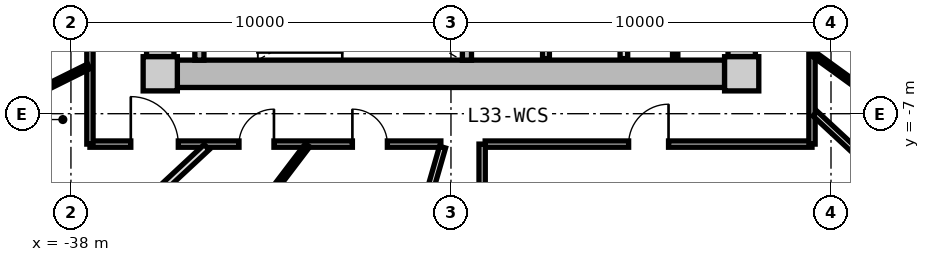
"""IFC4 building model, lengths in metres.
Left out: names, types, materials, properties, quantities, classifications, styles, units other than length and angle.
Written with IfcOpenShell. Run it as: python <this file> out.ifc"""

import sys

from ifc_helpers import new_model, si_unit, direction, frame, frame_2d, origin, origin_2d, place, context, subcontext, project, spatial, rectangle, extrude, source, transform, mapped, element, fill, save


model = new_model("IFC4")
c1 = context("Model", 3, precision=1e-05, world=origin(), true_north=direction((0.0, 1.0)))
c2 = subcontext(c1, "Body", "Model", "MODEL_VIEW")
j1 = project(units=[si_unit("LENGTHUNIT", "METRE"), si_unit("PLANEANGLEUNIT", "RADIAN")], contexts=[c1])
p1 = place(None, origin())
s1 = spatial("IfcSite", under=j1, at=p1, CompositionType="ELEMENT")
p2 = place(p1, origin())
s2 = spatial("IfcBuilding", under=s1, at=p2, CompositionType="ELEMENT")
p3 = place(p2, frame((0.0, 0.0, 108.45)))
s3 = spatial("IfcBuildingStorey", under=s2, at=p3, CompositionType="ELEMENT", Elevation=108.45)
m1 = source(origin(), c2, "Body", "SweptSolid", [
    extrude(rectangle(XDim=0.9, YDim=0.9, at=origin_2d()), origin(), (0.0, 0.0, 1.0), 3.05),
])
for number, where, z_axis, x_axis in (
    (1, (-35.65, -5.95, 0.0), (0.0, 0.0, 1.0), (1.0, 0.0, 0.0)),
    (2, (-20.35, -5.95, 0.0), (0.0, 0.0, 1.0), (1.0, 0.0, 0.0)),
):
    element("IfcColumn", number, at=place(p3, frame(where, z_axis=z_axis, x_axis=x_axis)), inside=s3, PredefinedType="COLUMN", context=c2, shape_type="MappedRepresentation", body=[
        mapped(m1, transform((0.0, 0.0, 0.0), x_axis=(1.0, 0.0, 0.0), y_axis=(0.0, 1.0, 0.0), z_axis=(0.0, 0.0, 1.0), scale=1.0)),
    ])
m2 = source(origin(), c2, "Body", "SweptSolid", [
    extrude(rectangle(XDim=14.4, YDim=0.72, at=frame_2d((7.2, 0.0))), origin(), (0.0, 0.0, 1.0), 2.79),
])
p4 = place(p3, frame((-20.8, -5.95, 0.0), z_axis=(0.0, 0.0, 1.0), x_axis=(-1.0, 0.0, 0.0)))
e3 = element("IfcWall", 3, at=p4, inside=s3, PredefinedType="SHEAR", context=c2, shape_type="MappedRepresentation", body=[
    mapped(m2, transform((0.0, 0.0, 0.0), x_axis=(1.0, 0.0, 0.0), y_axis=(0.0, 1.0, 0.0), z_axis=(0.0, 0.0, 1.0), scale=1.0)),
])
m3 = source(origin(), c2, "Body", "SweptSolid", [
    extrude(rectangle(XDim=11.0, YDim=0.72, at=frame_2d((5.5, 0.0))), origin(), (0.0, 0.0, 1.0), 2.79),
])
p5 = place(p3, frame((-35.65, -5.5, 0.0), z_axis=(0.0, 0.0, 1.0), x_axis=(0.0, 1.0, 0.0)))
e4 = element("IfcWall", 4, at=p5, inside=s3, PredefinedType="SHEAR", context=c2, shape_type="MappedRepresentation", body=[
    mapped(m3, transform((0.0, 0.0, 0.0), x_axis=(1.0, 0.0, 0.0), y_axis=(0.0, 1.0, 0.0), z_axis=(0.0, 0.0, 1.0), scale=1.0)),
])
p6 = place(p5, frame((3.8, 0.0, 0.0)))
e5 = element("IfcOpeningElement", 5, at=p6, cuts=e4, PredefinedType="OPENING", context=c2, shape_type="SweptSolid", body=[
    extrude(rectangle(XDim=1.2, YDim=2.15, at=frame_2d((0.6, 1.075))), frame((0.0, 0.37, 0.0), z_axis=(0.0, -1.0, 0.0), x_axis=(1.0, 0.0, 0.0)), (0.0, 0.0, 1.0), 0.74),
])
p7 = place(p3, frame((-20.35, 5.5, 0.0), z_axis=(0.0, 0.0, 1.0), x_axis=(0.0, -1.0, 0.0)))
e6 = element("IfcWall", 6, at=p7, inside=s3, PredefinedType="SHEAR", context=c2, shape_type="MappedRepresentation", body=[
    mapped(m3, transform((0.0, 0.0, 0.0), x_axis=(1.0, 0.0, 0.0), y_axis=(0.0, 1.0, 0.0), z_axis=(0.0, 0.0, 1.0), scale=1.0)),
])
p8 = place(p7, frame((5.65, 0.0, 0.0)))
e7 = element("IfcOpeningElement", 7, at=p8, cuts=e6, PredefinedType="OPENING", context=c2, shape_type="SweptSolid", body=[
    extrude(rectangle(XDim=1.2, YDim=2.15, at=frame_2d((0.6, 1.075))), frame((0.0, 0.37, 0.0), z_axis=(0.0, -1.0, 0.0), x_axis=(1.0, 0.0, 0.0)), (0.0, 0.0, 1.0), 0.74),
])
m4 = source(origin(), c2, "Body", "SweptSolid", [
    extrude(rectangle(XDim=3.14, YDim=0.24, at=frame_2d((1.57, 0.0))), origin(), (0.0, 0.0, 1.0), 2.79),
])
for number, where, z_axis, x_axis in (
    (8, (-34.62, -5.59, 0.0), (0.0, 0.0, 1.0), (0.0, 1.0, 0.0)),
    (9, (-27.58, -5.59, 0.0), (0.0, 0.0, 1.0), (0.0, 1.0, 0.0)),
):
    element("IfcWall", number, at=place(p3, frame(where, z_axis=z_axis, x_axis=x_axis)), inside=s3, PredefinedType="PARTITIONING", context=c2, shape_type="MappedRepresentation", body=[
        mapped(m4, transform((0.0, 0.0, 0.0), x_axis=(1.0, 0.0, 0.0), y_axis=(0.0, 1.0, 0.0), z_axis=(0.0, 0.0, 1.0), scale=1.0)),
    ])
m5 = source(origin(), c2, "Body", "SweptSolid", [
    extrude(rectangle(XDim=3.8, YDim=0.2, at=frame_2d((1.9, 0.0))), origin(), (0.0, 0.0, 1.0), 2.775),
])
p9 = place(p3, frame((-23.45, -5.55, 0.0), z_axis=(0.0, 0.0, 1.0), x_axis=(0.0, 1.0, 0.0)))
e10 = element("IfcWall", 10, at=p9, inside=s3, PredefinedType="PARTITIONING", context=c2, shape_type="MappedRepresentation", body=[
    mapped(m5, transform((0.0, 0.0, 0.0), x_axis=(1.0, 0.0, 0.0), y_axis=(0.0, 1.0, 0.0), z_axis=(0.0, 0.0, 1.0), scale=1.0)),
])
m6 = source(origin(), c2, "Body", "SweptSolid", [
    extrude(rectangle(XDim=3.22, YDim=0.18, at=frame_2d((1.61, 0.0))), origin(), (0.0, 0.0, 1.0), 2.775),
])
p10 = place(p3, frame((-25.5, -5.55, 0.0), z_axis=(0.0, 0.0, 1.0), x_axis=(0.0, 1.0, 0.0)))
e11 = element("IfcWall", 11, at=p10, inside=s3, PredefinedType="PARTITIONING", context=c2, shape_type="MappedRepresentation", body=[
    mapped(m6, transform((0.0, 0.0, 0.0), x_axis=(1.0, 0.0, 0.0), y_axis=(0.0, 1.0, 0.0), z_axis=(0.0, 0.0, 1.0), scale=1.0)),
])
m7 = source(origin(), c2, "Body", "SweptSolid", [
    extrude(rectangle(XDim=3.8, YDim=0.14, at=frame_2d((1.9, 0.0))), origin(), (0.0, 0.0, 1.0), 2.775),
])
p11 = place(p3, frame((-22.1, -5.55, 0.0), z_axis=(0.0, 0.0, 1.0), x_axis=(0.0, 1.0, 0.0)))
e12 = element("IfcWall", 12, at=p11, inside=s3, PredefinedType="PARTITIONING", context=c2, shape_type="MappedRepresentation", body=[
    mapped(m7, transform((0.0, 0.0, 0.0), x_axis=(1.0, 0.0, 0.0), y_axis=(0.0, 1.0, 0.0), z_axis=(0.0, 0.0, 1.0), scale=1.0)),
])
m8 = source(origin(), c2, "Body", "SweptSolid", [
    extrude(rectangle(XDim=8.6, YDim=0.165, at=frame_2d((4.3, 0.0))), origin(), (0.0, 0.0, 1.0), 2.775),
])
p12 = place(p3, frame((-18.5, -7.8, 0.0), z_axis=(0.0, 0.0, 1.0), x_axis=(-1.0, 0.0, 0.0)))
e13 = element("IfcWall", 13, at=p12, inside=s3, PredefinedType="PARTITIONING", context=c2, shape_type="MappedRepresentation", body=[
    mapped(m8, transform((0.0, 0.0, 0.0), x_axis=(1.0, 0.0, 0.0), y_axis=(0.0, 1.0, 0.0), z_axis=(0.0, 0.0, 1.0), scale=1.0)),
])
p13 = place(p12, frame((3.775, 0.0, 0.0)))
e14 = element("IfcOpeningElement", 14, at=p13, cuts=e13, PredefinedType="OPENING", context=c2, shape_type="SweptSolid", body=[
    extrude(rectangle(XDim=1.05, YDim=2.15, at=frame_2d((0.525, 1.075))), frame((0.0, 0.093, 0.0), z_axis=(0.0, -1.0, 0.0), x_axis=(1.0, 0.0, 0.0)), (0.0, 0.0, 1.0), 0.185),
])
m9 = source(origin(), c2, "Body", "SweptSolid", [
    extrude(rectangle(XDim=9.234, YDim=0.165, at=frame_2d((4.617, 0.0))), origin(), (0.0, 0.0, 1.0), 2.775),
])
p14 = place(p3, frame((-28.266, -7.8, 0.0), z_axis=(0.0, 0.0, 1.0), x_axis=(-1.0, 0.0, 0.0)))
e15 = element("IfcWall", 15, at=p14, inside=s3, PredefinedType="PARTITIONING", context=c2, shape_type="MappedRepresentation", body=[
    mapped(m9, transform((0.0, 0.0, 0.0), x_axis=(1.0, 0.0, 0.0), y_axis=(0.0, 1.0, 0.0), z_axis=(0.0, 0.0, 1.0), scale=1.0)),
])
p15 = place(p14, frame((6.909, 0.0, 0.0)))
e16 = element("IfcOpeningElement", 16, at=p15, cuts=e15, PredefinedType="OPENING", context=c2, shape_type="SweptSolid", body=[
    extrude(rectangle(XDim=1.25, YDim=2.2, at=frame_2d((0.625, 1.1))), frame((0.0, 0.093, 0.0), z_axis=(0.0, -1.0, 0.0), x_axis=(1.0, 0.0, 0.0)), (0.0, 0.0, 1.0), 0.185),
])
p16 = place(p14, frame((4.392, 0.0, 0.0)))
e17 = element("IfcOpeningElement", 17, at=p16, cuts=e15, PredefinedType="OPENING", context=c2, shape_type="SweptSolid", body=[
    extrude(rectangle(XDim=0.92, YDim=2.1, at=frame_2d((0.46, 1.05))), frame((0.0, 0.093, 0.0), z_axis=(0.0, -1.0, 0.0), x_axis=(1.0, 0.0, 0.0)), (0.0, 0.0, 1.0), 0.185),
])
p17 = place(p14, frame((1.408, 0.0, 0.0)))
e18 = element("IfcOpeningElement", 18, at=p17, cuts=e15, PredefinedType="OPENING", context=c2, shape_type="SweptSolid", body=[
    extrude(rectangle(XDim=0.92, YDim=2.1, at=frame_2d((0.46, 1.05))), frame((0.0, 0.093, 0.0), z_axis=(0.0, -1.0, 0.0), x_axis=(1.0, 0.0, 0.0)), (0.0, 0.0, 1.0), 0.185),
])
m10 = source(origin(), c2, "Body", "SweptSolid", [
    extrude(rectangle(XDim=15.6, YDim=0.165, at=frame_2d((7.8, 0.0))), origin(), (0.0, 0.0, 1.0), 2.775),
])
p18 = place(p3, frame((-37.5, -7.8, 0.0), z_axis=(0.0, 0.0, 1.0), x_axis=(0.0, 1.0, 0.0)))
e19 = element("IfcWall", 19, at=p18, inside=s3, PredefinedType="PARTITIONING", context=c2, shape_type="MappedRepresentation", body=[
    mapped(m10, transform((0.0, 0.0, 0.0), x_axis=(1.0, 0.0, 0.0), y_axis=(0.0, 1.0, 0.0), z_axis=(0.0, 0.0, 1.0), scale=1.0)),
])
p19 = place(p18, frame((11.994, 0.0, 0.0)))
e20 = element("IfcOpeningElement", 20, at=p19, cuts=e19, PredefinedType="OPENING", context=c2, shape_type="SweptSolid", body=[
    extrude(rectangle(XDim=1.25, YDim=2.2, at=frame_2d((0.625, 1.1))), frame((0.0, 0.093, 0.0), z_axis=(0.0, -1.0, 0.0), x_axis=(1.0, 0.0, 0.0)), (0.0, 0.0, 1.0), 0.185),
])
p20 = place(p18, frame((7.984, 0.0, 0.0)))
e21 = element("IfcOpeningElement", 21, at=p20, cuts=e19, PredefinedType="OPENING", context=c2, shape_type="SweptSolid", body=[
    extrude(rectangle(XDim=1.05, YDim=2.15, at=frame_2d((0.525, 1.075))), frame((0.0, 0.093, 0.0), z_axis=(0.0, -1.0, 0.0), x_axis=(1.0, 0.0, 0.0)), (0.0, 0.0, 1.0), 0.185),
])
p21 = place(p18, frame((5.777, 0.0, 0.0)))
e22 = element("IfcOpeningElement", 22, at=p21, cuts=e19, PredefinedType="OPENING", context=c2, shape_type="SweptSolid", body=[
    extrude(rectangle(XDim=1.05, YDim=2.15, at=frame_2d((0.525, 1.075))), frame((0.0, 0.093, 0.0), z_axis=(0.0, -1.0, 0.0), x_axis=(1.0, 0.0, 0.0)), (0.0, 0.0, 1.0), 0.185),
])
p22 = place(p3, frame((-18.5, 7.8, 0.0), z_axis=(0.0, 0.0, 1.0), x_axis=(0.0, -1.0, 0.0)))
e23 = element("IfcWall", 23, at=p22, inside=s3, PredefinedType="PARTITIONING", context=c2, shape_type="MappedRepresentation", body=[
    mapped(m10, transform((0.0, 0.0, 0.0), x_axis=(1.0, 0.0, 0.0), y_axis=(0.0, 1.0, 0.0), z_axis=(0.0, 0.0, 1.0), scale=1.0)),
])
p23 = place(p22, frame((12.002, 0.0, 0.0)))
e24 = element("IfcOpeningElement", 24, at=p23, cuts=e23, PredefinedType="OPENING", context=c2, shape_type="SweptSolid", body=[
    extrude(rectangle(XDim=1.05, YDim=2.15, at=frame_2d((0.525, 1.075))), frame((0.0, 0.093, 0.0), z_axis=(0.0, -1.0, 0.0), x_axis=(1.0, 0.0, 0.0)), (0.0, 0.0, 1.0), 0.185),
])
p24 = place(p22, frame((10.211, 0.0, 0.0)))
e25 = element("IfcOpeningElement", 25, at=p24, cuts=e23, PredefinedType="OPENING", context=c2, shape_type="SweptSolid", body=[
    extrude(rectangle(XDim=1.05, YDim=2.15, at=frame_2d((0.525, 1.075))), frame((0.0, 0.093, 0.0), z_axis=(0.0, -1.0, 0.0), x_axis=(1.0, 0.0, 0.0)), (0.0, 0.0, 1.0), 0.185),
])
p25 = place(p22, frame((7.722, 0.0, 0.0)))
e26 = element("IfcOpeningElement", 26, at=p25, cuts=e23, PredefinedType="OPENING", context=c2, shape_type="SweptSolid", body=[
    extrude(rectangle(XDim=1.05, YDim=2.15, at=frame_2d((0.525, 1.075))), frame((0.0, 0.093, 0.0), z_axis=(0.0, -1.0, 0.0), x_axis=(1.0, 0.0, 0.0)), (0.0, 0.0, 1.0), 0.185),
])
p26 = place(p22, frame((6.291, 0.0, 0.0)))
e27 = element("IfcOpeningElement", 27, at=p26, cuts=e23, PredefinedType="OPENING", context=c2, shape_type="SweptSolid", body=[
    extrude(rectangle(XDim=1.05, YDim=2.15, at=frame_2d((0.525, 1.075))), frame((0.0, 0.093, 0.0), z_axis=(0.0, -1.0, 0.0), x_axis=(1.0, 0.0, 0.0)), (0.0, 0.0, 1.0), 0.185),
])
p27 = place(p22, frame((2.465, 0.0, 0.0)))
e28 = element("IfcOpeningElement", 28, at=p27, cuts=e23, PredefinedType="OPENING", context=c2, shape_type="SweptSolid", body=[
    extrude(rectangle(XDim=1.25, YDim=2.2, at=frame_2d((0.625, 1.1))), frame((0.0, 0.093, 0.0), z_axis=(0.0, -1.0, 0.0), x_axis=(1.0, 0.0, 0.0)), (0.0, 0.0, 1.0), 0.185),
])
m11 = source(origin(), c2, "Body", "SweptSolid", [
    extrude(rectangle(XDim=8.989, YDim=0.165, at=frame_2d((4.495, 0.0))), origin(), (0.0, 0.0, 1.0), 2.275),
])
p28 = place(p3, frame((-28.222, -7.88, 0.0), z_axis=(0.0, 0.0, 1.0), x_axis=(-0.27702323008, -0.960863221274, 0.0)))
e29 = element("IfcWall", 29, at=p28, inside=s3, PredefinedType="PARTITIONING", context=c2, shape_type="MappedRepresentation", body=[
    mapped(m11, transform((0.0, 0.0, 0.0), x_axis=(1.0, 0.0, 0.0), y_axis=(0.0, 1.0, 0.0), z_axis=(0.0, 0.0, 1.0), scale=1.0)),
])
m12 = source(origin(), c2, "Body", "SweptSolid", [
    extrude(rectangle(XDim=7.482, YDim=0.165, at=frame_2d((3.741, 0.0))), origin(), (0.0, 0.0, 1.0), 2.275),
])
p29 = place(p3, frame((-18.42, -6.998, 0.0), z_axis=(0.0, 0.0, 1.0), x_axis=(0.732508698043, -0.680757671489, 0.0)))
e30 = element("IfcWall", 30, at=p29, inside=s3, PredefinedType="PARTITIONING", context=c2, shape_type="MappedRepresentation", body=[
    mapped(m12, transform((0.0, 0.0, 0.0), x_axis=(1.0, 0.0, 0.0), y_axis=(0.0, 1.0, 0.0), z_axis=(0.0, 0.0, 1.0), scale=1.0)),
])
m13 = source(origin(), c2, "Body", "SweptSolid", [
    extrude(rectangle(XDim=7.56, YDim=0.165, at=frame_2d((3.78, 0.0))), origin(), (0.0, 0.0, 1.0), 2.775),
])
p30 = place(p3, frame((-27.18, -15.36, 0.0), z_axis=(0.0, 0.0, 1.0), x_axis=(0.0, 1.0, 0.0)))
e31 = element("IfcWall", 31, at=p30, inside=s3, PredefinedType="PARTITIONING", context=c2, shape_type="MappedRepresentation", body=[
    mapped(m13, transform((0.0, 0.0, 0.0), x_axis=(1.0, 0.0, 0.0), y_axis=(0.0, 1.0, 0.0), z_axis=(0.0, 0.0, 1.0), scale=1.0)),
])
m14 = source(origin(), c2, "Body", "SweptSolid", [
    extrude(rectangle(XDim=6.187, YDim=0.19, at=frame_2d((3.093, 0.0))), origin(), (0.0, 0.0, 1.0), 2.275),
])
p31 = place(p3, frame((-34.429, -7.88, 0.0), z_axis=(0.0, 0.0, 1.0), x_axis=(-0.732501077882, -0.680765870841, 0.0)))
e32 = element("IfcWall", 32, at=p31, inside=s3, PredefinedType="PARTITIONING", context=c2, shape_type="MappedRepresentation", body=[
    mapped(m14, transform((0.0, 0.0, 0.0), x_axis=(1.0, 0.0, 0.0), y_axis=(0.0, 1.0, 0.0), z_axis=(0.0, 0.0, 1.0), scale=1.0)),
])
m15 = source(origin(), c2, "Body", "SweptSolid", [
    extrude(rectangle(XDim=2.469, YDim=0.14, at=frame_2d((1.235, 0.0))), origin(), (0.0, 0.0, 1.0), 2.775),
])
p32 = place(p3, frame((-37.53, -5.754, 0.0), z_axis=(0.0, 0.0, 1.0), x_axis=(-0.895512172456, -0.445037019789, 0.0)))
e33 = element("IfcWall", 33, at=p32, inside=s3, PredefinedType="PARTITIONING", context=c2, shape_type="MappedRepresentation", body=[
    mapped(m15, transform((0.0, 0.0, 0.0), x_axis=(1.0, 0.0, 0.0), y_axis=(0.0, 1.0, 0.0), z_axis=(0.0, 0.0, 1.0), scale=1.0)),
])
m16 = source(origin(), c2, "Body", "SweptSolid", [
    extrude(rectangle(XDim=7.243, YDim=0.14, at=frame_2d((3.621, 0.0))), origin(), (0.0, 0.0, 1.0), 2.775),
])
p33 = place(p3, frame((-31.774, -7.83, 0.0), z_axis=(0.0, 0.0, 1.0), x_axis=(-0.605111472002, -0.796140757939, 0.0)))
e34 = element("IfcWall", 34, at=p33, inside=s3, PredefinedType="PARTITIONING", context=c2, shape_type="MappedRepresentation", body=[
    mapped(m16, transform((0.0, 0.0, 0.0), x_axis=(1.0, 0.0, 0.0), y_axis=(0.0, 1.0, 0.0), z_axis=(0.0, 0.0, 1.0), scale=1.0)),
])
m17 = source(origin(), c2, "Body", "SweptSolid", [
    extrude(rectangle(XDim=8.744, YDim=0.19, at=frame_2d((4.372, 0.0))), origin(), (0.0, 0.0, 1.0), 2.775),
])
p34 = place(p3, frame((-18.273, -4.142, 0.0), z_axis=(0.0, 0.0, 1.0), x_axis=(0.882252449936, -0.470776607938, 0.0)))
e35 = element("IfcWall", 35, at=p34, inside=s3, PredefinedType="PARTITIONING", context=c2, shape_type="MappedRepresentation", body=[
    mapped(m17, transform((0.0, 0.0, 0.0), x_axis=(1.0, 0.0, 0.0), y_axis=(0.0, 1.0, 0.0), z_axis=(0.0, 0.0, 1.0), scale=1.0)),
])
m18 = source(origin(), c2, "Body", "SweptSolid", [
    extrude(rectangle(XDim=3.621, YDim=0.14, at=frame_2d((1.811, 0.0))), origin(), (0.0, 0.0, 1.0), 2.775),
])
p35 = place(p3, frame((-18.47, -5.422, 0.0), z_axis=(0.0, 0.0, 1.0), x_axis=(0.80968252222, -0.586868139544, 0.0)))
e36 = element("IfcWall", 36, at=p35, inside=s3, PredefinedType="PARTITIONING", context=c2, shape_type="MappedRepresentation", body=[
    mapped(m18, transform((0.0, 0.0, 0.0), x_axis=(1.0, 0.0, 0.0), y_axis=(0.0, 1.0, 0.0), z_axis=(0.0, 0.0, 1.0), scale=1.0)),
])
p36 = place(p35, frame((1.351, 0.0, 0.0)))
e37 = element("IfcOpeningElement", 37, at=p36, cuts=e36, PredefinedType="OPENING", context=c2, shape_type="SweptSolid", body=[
    extrude(rectangle(XDim=0.92, YDim=2.1, at=frame_2d((0.46, 1.05))), frame((0.0, 0.08, 0.0), z_axis=(0.0, -1.0, 0.0), x_axis=(1.0, 0.0, 0.0)), (0.0, 0.0, 1.0), 0.16),
])
m19 = source(origin(), c2, "Body", "SweptSolid", [
    extrude(rectangle(XDim=1.05, YDim=2.15, at=frame_2d((0.525, 1.075))), frame((0.0, 0.025, 0.0), z_axis=(0.0, -1.0, 0.0), x_axis=(1.0, 0.0, 0.0)), (0.0, 0.0, 1.0), 0.05),
])
p37 = place(p13, frame((1.05, 0.0, 0.0), z_axis=(0.0, 0.0, 1.0), x_axis=(-1.0, 0.0, 0.0)))
e38 = element("IfcDoor", 38, at=p37, inside=s3, OperationType="SINGLE_SWING_RIGHT", PredefinedType="DOOR", context=c2, shape_type="MappedRepresentation", body=[
    mapped(m19, transform((0.0, 0.0, 0.0), x_axis=(1.0, 0.0, 0.0), y_axis=(0.0, 1.0, 0.0), z_axis=(0.0, 0.0, 1.0), scale=1.0)),
])
fill(e14, e38)
m20 = source(origin(), c2, "Body", "SweptSolid", [
    extrude(rectangle(XDim=1.25, YDim=2.2, at=frame_2d((0.625, 1.1))), frame((0.0, 0.025, 0.0), z_axis=(0.0, -1.0, 0.0), x_axis=(1.0, 0.0, 0.0)), (0.0, 0.0, 1.0), 0.05),
])
p38 = place(p15, frame((1.25, 0.0, 0.0), z_axis=(0.0, 0.0, 1.0), x_axis=(-1.0, 0.0, 0.0)))
e39 = element("IfcDoor", 39, at=p38, inside=s3, OperationType="SINGLE_SWING_LEFT", PredefinedType="DOOR", context=c2, shape_type="MappedRepresentation", body=[
    mapped(m20, transform((0.0, 0.0, 0.0), x_axis=(1.0, 0.0, 0.0), y_axis=(0.0, 1.0, 0.0), z_axis=(0.0, 0.0, 1.0), scale=1.0)),
])
fill(e16, e39)
m21 = source(origin(), c2, "Body", "SweptSolid", [
    extrude(rectangle(XDim=0.92, YDim=2.1, at=frame_2d((0.46, 1.05))), frame((0.0, 0.025, 0.0), z_axis=(0.0, -1.0, 0.0), x_axis=(1.0, 0.0, 0.0)), (0.0, 0.0, 1.0), 0.05),
])
p39 = place(p16, frame((0.92, 0.0, 0.0), z_axis=(0.0, 0.0, 1.0), x_axis=(-1.0, 0.0, 0.0)))
e40 = element("IfcDoor", 40, at=p39, inside=s3, OperationType="SINGLE_SWING_RIGHT", PredefinedType="DOOR", context=c2, shape_type="MappedRepresentation", body=[
    mapped(m21, transform((0.0, 0.0, 0.0), x_axis=(1.0, 0.0, 0.0), y_axis=(0.0, 1.0, 0.0), z_axis=(0.0, 0.0, 1.0), scale=1.0)),
])
fill(e17, e40)
p40 = place(p17, frame((0.92, 0.0, 0.0), z_axis=(0.0, 0.0, 1.0), x_axis=(-1.0, 0.0, 0.0)))
e41 = element("IfcDoor", 41, at=p40, inside=s3, OperationType="SINGLE_SWING_LEFT", PredefinedType="DOOR", context=c2, shape_type="MappedRepresentation", body=[
    mapped(m21, transform((0.0, 0.0, 0.0), x_axis=(1.0, 0.0, 0.0), y_axis=(0.0, 1.0, 0.0), z_axis=(0.0, 0.0, 1.0), scale=1.0)),
])
fill(e18, e41)
save(model, sys.argv[1])
